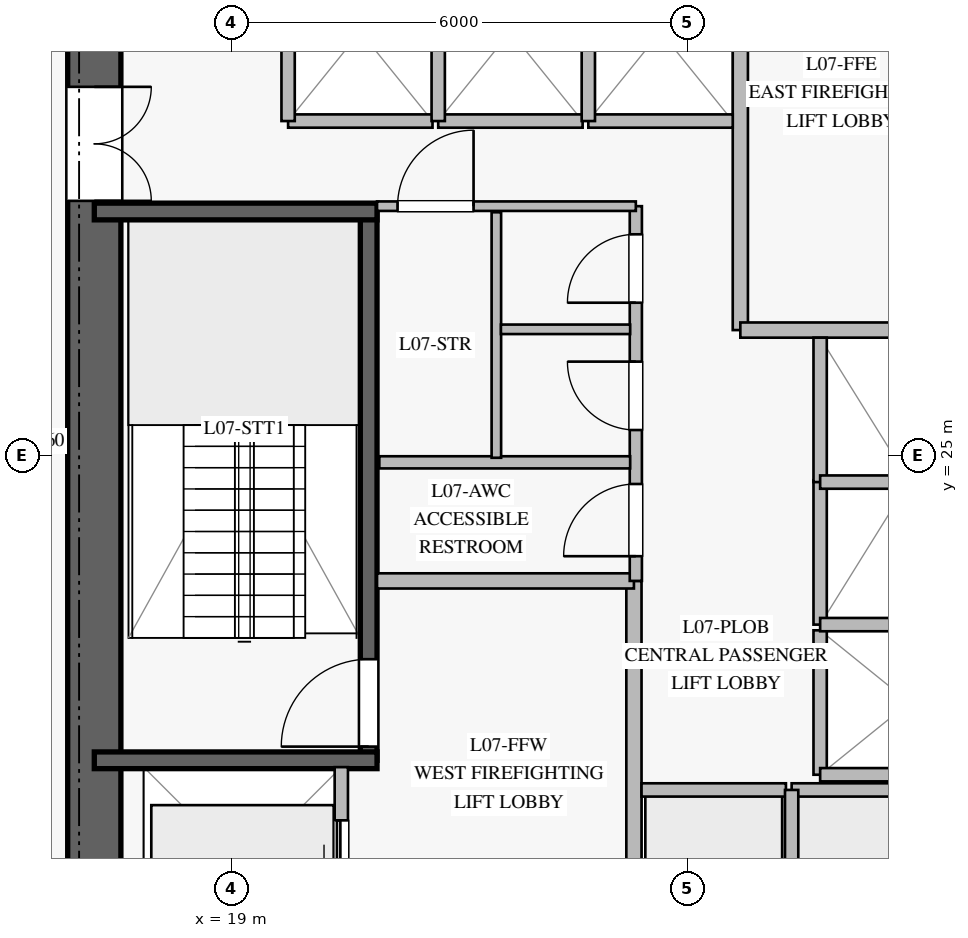
"""IFC4 building model, lengths in metres.
Left out: names, types, materials, properties, quantities, classifications, styles, units other than length and angle.
Written with IfcOpenShell. Run it as: python <this file> out.ifc"""

import sys

from ifc_helpers import new_model, si_unit, direction, frame, frame_2d, origin, place, context, subcontext, project, spatial, rectangle, extrude, element, fill, save


model = new_model("IFC4")
c1 = context("Model", 3, precision=1e-05, world=origin(), true_north=direction((0.0, 1.0)))
c2 = subcontext(c1, "Body", "Model", "MODEL_VIEW")
j1 = project(units=[si_unit("LENGTHUNIT", "METRE"), si_unit("PLANEANGLEUNIT", "RADIAN")], contexts=[c1])
p1 = place(None, origin())
s1 = spatial("IfcSite", under=j1, at=p1, CompositionType="ELEMENT")
p2 = place(p1, origin())
s2 = spatial("IfcBuilding", under=s1, at=p2, CompositionType="ELEMENT")
p3 = place(p2, frame((0.0, 0.0, 32.0)))
s3 = spatial("IfcBuildingStorey", under=s2, at=p3, CompositionType="ELEMENT", Elevation=32.0)
p4 = place(p3, frame((17.2, 31.85, 0.0), z_axis=(0.0, 0.0, 1.0), x_axis=(0.0, -1.0, 0.0)))
e1 = element("IfcWall", 1, at=p4, inside=s3, PredefinedType="SHEAR", context=c2, shape_type="SweptSolid", body=[
    extrude(rectangle(XDim=13.7, YDim=0.7, at=frame_2d((6.85, 0.0))), origin(), (0.0, 0.0, 1.0), 3.76),
])
p5 = place(p4, frame((2.0, 0.0, 0.0)))
e2 = element("IfcOpeningElement", 2, at=p5, cuts=e1, PredefinedType="OPENING", context=c2, shape_type="SweptSolid", body=[
    extrude(rectangle(XDim=1.5, YDim=2.2, at=frame_2d((0.75, 1.1))), frame((0.0, 0.36, 0.0), z_axis=(0.0, -1.0, 0.0), x_axis=(1.0, 0.0, 0.0)), (0.0, 0.0, 1.0), 0.72),
])
p6 = place(p3, frame((20.81, 20.99, 0.0), z_axis=(0.0, 0.0, 1.0), x_axis=(0.0, 1.0, 0.0)))
e3 = element("IfcWall", 3, at=p6, inside=s3, PredefinedType="SOLIDWALL", context=c2, shape_type="SweptSolid", body=[
    extrude(rectangle(XDim=7.22, YDim=0.22, at=frame_2d((3.61, 0.0))), origin(), (0.0, 0.0, 1.0), 3.76),
])
p7 = place(p6, frame((0.18, 0.0, 0.0)))
e4 = element("IfcOpeningElement", 4, at=p7, cuts=e3, PredefinedType="OPENING", context=c2, shape_type="SweptSolid", body=[
    extrude(rectangle(XDim=1.15, YDim=2.2, at=frame_2d((0.575, 1.1))), frame((0.0, 0.12, 0.0), z_axis=(0.0, -1.0, 0.0), x_axis=(1.0, 0.0, 0.0)), (0.0, 0.0, 1.0), 0.24),
])
for number, where, z_axis, x_axis in (
    (5, (17.2, 20.99, 0.0), (0.0, 0.0, 1.0), (1.0, 0.0, 0.0)),
    (6, (17.2, 28.21, 0.0), (0.0, 0.0, 1.0), (1.0, 0.0, 0.0)),
):
    element("IfcWall", number, at=place(p3, frame(where, z_axis=z_axis, x_axis=x_axis)), inside=s3, PredefinedType="SOLIDWALL", context=c2, shape_type="SweptSolid", body=[
        extrude(rectangle(XDim=3.72, YDim=0.22, at=frame_2d((1.86, 0.0))), origin(), (0.0, 0.0, 1.0), 3.76),
    ])
p8 = place(p3, frame((24.3, 18.2, 0.0), z_axis=(0.0, 0.0, 1.0), x_axis=(0.0, 1.0, 0.0)))
e7 = element("IfcWall", 7, at=p8, inside=s3, PredefinedType="PARTITIONING", context=c2, shape_type="SweptSolid", body=[
    extrude(rectangle(XDim=5.15, YDim=0.2, at=frame_2d((2.575, 0.0))), origin(), (0.0, 0.0, 1.0), 3.76),
])
p9 = place(p3, frame((20.92, 23.35, 0.0), z_axis=(0.0, 0.0, 1.0), x_axis=(1.0, 0.0, 0.0)))
e8 = element("IfcWall", 8, at=p9, inside=s3, PredefinedType="PARTITIONING", context=c2, shape_type="SweptSolid", body=[
    extrude(rectangle(XDim=3.38, YDim=0.2, at=frame_2d((1.69, 0.0))), origin(), (0.0, 0.0, 1.0), 3.76),
])
p10 = place(p3, frame((25.7, 26.65, 0.0), z_axis=(0.0, 0.0, 1.0), x_axis=(0.0, 1.0, 0.0)))
e9 = element("IfcWall", 9, at=p10, inside=s3, PredefinedType="PARTITIONING", context=c2, shape_type="SweptSolid", body=[
    extrude(rectangle(XDim=5.15, YDim=0.2, at=frame_2d((2.575, 0.0))), origin(), (0.0, 0.0, 1.0), 3.76),
])
p11 = place(p3, frame((25.7, 26.65, 0.0), z_axis=(0.0, 0.0, 1.0), x_axis=(1.0, 0.0, 0.0)))
e10 = element("IfcWall", 10, at=p11, inside=s3, PredefinedType="PARTITIONING", context=c2, shape_type="SweptSolid", body=[
    extrude(rectangle(XDim=3.38, YDim=0.2, at=frame_2d((1.69, 0.0))), origin(), (0.0, 0.0, 1.0), 3.76),
])
p12 = place(p3, frame((24.325, 23.35, 0.0), z_axis=(0.0, 0.0, 1.0), x_axis=(0.0, 1.0, 0.0)))
e11 = element("IfcWall", 11, at=p12, inside=s3, PredefinedType="PLUMBINGWALL", context=c2, shape_type="SweptSolid", body=[
    extrude(rectangle(XDim=4.93, YDim=0.16, at=frame_2d((2.465, 0.0))), origin(), (0.0, 0.0, 1.0), 3.76),
])
p13 = place(p12, frame((0.325, 0.0, 0.0)))
e12 = element("IfcOpeningElement", 12, at=p13, cuts=e11, PredefinedType="OPENING", context=c2, shape_type="SweptSolid", body=[
    extrude(rectangle(XDim=0.95, YDim=2.1, at=frame_2d((0.475, 1.05))), frame((0.0, 0.09, 0.0), z_axis=(0.0, -1.0, 0.0), x_axis=(1.0, 0.0, 0.0)), (0.0, 0.0, 1.0), 0.18),
])
p14 = place(p12, frame((1.985, 0.0, 0.0)))
e13 = element("IfcOpeningElement", 13, at=p14, cuts=e11, PredefinedType="OPENING", context=c2, shape_type="SweptSolid", body=[
    extrude(rectangle(XDim=0.9, YDim=2.1, at=frame_2d((0.45, 1.05))), frame((0.0, 0.09, 0.0), z_axis=(0.0, -1.0, 0.0), x_axis=(1.0, 0.0, 0.0)), (0.0, 0.0, 1.0), 0.18),
])
p15 = place(p12, frame((3.66, 0.0, 0.0)))
e14 = element("IfcOpeningElement", 14, at=p15, cuts=e11, PredefinedType="OPENING", context=c2, shape_type="SweptSolid", body=[
    extrude(rectangle(XDim=0.9, YDim=2.1, at=frame_2d((0.45, 1.05))), frame((0.0, 0.09, 0.0), z_axis=(0.0, -1.0, 0.0), x_axis=(1.0, 0.0, 0.0)), (0.0, 0.0, 1.0), 0.18),
])
p16 = place(p3, frame((20.92, 28.28, 0.0), z_axis=(0.0, 0.0, 1.0), x_axis=(1.0, 0.0, 0.0)))
e15 = element("IfcWall", 15, at=p16, inside=s3, PredefinedType="PARTITIONING", context=c2, shape_type="SweptSolid", body=[
    extrude(rectangle(XDim=3.405, YDim=0.125, at=frame_2d((1.703, 0.0))), origin(), (0.0, 0.0, 1.0), 3.76),
])
p17 = place(p16, frame((0.27, 0.0, 0.0)))
e16 = element("IfcOpeningElement", 16, at=p17, cuts=e15, PredefinedType="OPENING", context=c2, shape_type="SweptSolid", body=[
    extrude(rectangle(XDim=1.0, YDim=2.15, at=frame_2d((0.5, 1.075))), frame((0.0, 0.073, 0.0), z_axis=(0.0, -1.0, 0.0), x_axis=(1.0, 0.0, 0.0)), (0.0, 0.0, 1.0), 0.145),
])
p18 = place(p3, frame((20.95, 24.91, 0.0), z_axis=(0.0, 0.0, 1.0), x_axis=(1.0, 0.0, 0.0)))
e17 = element("IfcWall", 17, at=p18, inside=s3, PredefinedType="PLUMBINGWALL", context=c2, shape_type="SweptSolid", body=[
    extrude(rectangle(XDim=3.3, YDim=0.16, at=frame_2d((1.65, 0.0))), origin(), (0.0, 0.0, 1.0), 3.76),
])
p19 = place(p3, frame((22.49, 24.97, 0.0), z_axis=(0.0, 0.0, 1.0), x_axis=(0.0, 1.0, 0.0)))
e18 = element("IfcWall", 18, at=p19, inside=s3, PredefinedType="PARTITIONING", context=c2, shape_type="SweptSolid", body=[
    extrude(rectangle(XDim=3.23, YDim=0.125, at=frame_2d((1.615, 0.0))), origin(), (0.0, 0.0, 1.0), 3.76),
])
p20 = place(p3, frame((22.55, 26.66, 0.0), z_axis=(0.0, 0.0, 1.0), x_axis=(1.0, 0.0, 0.0)))
e19 = element("IfcWall", 19, at=p20, inside=s3, PredefinedType="PARTITIONING", context=c2, shape_type="SweptSolid", body=[
    extrude(rectangle(XDim=1.7, YDim=0.125, at=frame_2d((0.85, 0.0))), origin(), (0.0, 0.0, 1.0), 3.76),
])
p21 = place(p3, frame((24.4, 20.6, 0.0), z_axis=(0.0, 0.0, 1.0), x_axis=(1.0, 0.0, 0.0)))
e20 = element("IfcWall", 20, at=p21, inside=s3, PredefinedType="PARTITIONING", context=c2, shape_type="SweptSolid", body=[
    extrude(rectangle(XDim=1.9, YDim=0.175, at=frame_2d((0.95, 0.0))), origin(), (0.0, 0.0, 1.0), 3.76),
])
p22 = place(p3, frame((26.375, 20.6, 0.0), z_axis=(0.0, 0.0, 1.0), x_axis=(1.0, 0.0, 0.0)))
e21 = element("IfcWall", 21, at=p22, inside=s3, PredefinedType="PARTITIONING", context=c2, shape_type="SweptSolid", body=[
    extrude(rectangle(XDim=1.9, YDim=0.175, at=frame_2d((0.95, 0.0))), origin(), (0.0, 0.0, 1.0), 3.76),
])
p23 = place(p3, frame((26.375, 18.25, 0.0), z_axis=(0.0, 0.0, 1.0), x_axis=(0.0, 1.0, 0.0)))
e22 = element("IfcWall", 22, at=p23, inside=s3, PredefinedType="PARTITIONING", context=c2, shape_type="SweptSolid", body=[
    extrude(rectangle(XDim=2.35, YDim=0.175, at=frame_2d((1.175, 0.0))), origin(), (0.0, 0.0, 1.0), 3.76),
])
p24 = place(p3, frame((19.75, 29.4, 0.0), z_axis=(0.0, 0.0, 1.0), x_axis=(1.0, 0.0, 0.0)))
e23 = element("IfcWall", 23, at=p24, inside=s3, PredefinedType="PARTITIONING", context=c2, shape_type="SweptSolid", body=[
    extrude(rectangle(XDim=1.9, YDim=0.175, at=frame_2d((0.95, 0.0))), origin(), (0.0, 0.0, 1.0), 3.76),
])
p25 = place(p3, frame((19.75, 29.4, 0.0), z_axis=(0.0, 0.0, 1.0), x_axis=(0.0, 1.0, 0.0)))
e24 = element("IfcWall", 24, at=p25, inside=s3, PredefinedType="PARTITIONING", context=c2, shape_type="SweptSolid", body=[
    extrude(rectangle(XDim=2.35, YDim=0.175, at=frame_2d((1.175, 0.0))), origin(), (0.0, 0.0, 1.0), 3.76),
])
p26 = place(p3, frame((21.725, 29.4, 0.0), z_axis=(0.0, 0.0, 1.0), x_axis=(1.0, 0.0, 0.0)))
e25 = element("IfcWall", 25, at=p26, inside=s3, PredefinedType="PARTITIONING", context=c2, shape_type="SweptSolid", body=[
    extrude(rectangle(XDim=1.9, YDim=0.175, at=frame_2d((0.95, 0.0))), origin(), (0.0, 0.0, 1.0), 3.76),
])
p27 = place(p3, frame((21.725, 29.4, 0.0), z_axis=(0.0, 0.0, 1.0), x_axis=(0.0, 1.0, 0.0)))
e26 = element("IfcWall", 26, at=p27, inside=s3, PredefinedType="PARTITIONING", context=c2, shape_type="SweptSolid", body=[
    extrude(rectangle(XDim=2.35, YDim=0.175, at=frame_2d((1.175, 0.0))), origin(), (0.0, 0.0, 1.0), 3.76),
])
p28 = place(p3, frame((23.7, 29.4, 0.0), z_axis=(0.0, 0.0, 1.0), x_axis=(1.0, 0.0, 0.0)))
e27 = element("IfcWall", 27, at=p28, inside=s3, PredefinedType="PARTITIONING", context=c2, shape_type="SweptSolid", body=[
    extrude(rectangle(XDim=1.9, YDim=0.175, at=frame_2d((0.95, 0.0))), origin(), (0.0, 0.0, 1.0), 3.76),
])
p29 = place(p3, frame((23.7, 29.4, 0.0), z_axis=(0.0, 0.0, 1.0), x_axis=(0.0, 1.0, 0.0)))
e28 = element("IfcWall", 28, at=p29, inside=s3, PredefinedType="PARTITIONING", context=c2, shape_type="SweptSolid", body=[
    extrude(rectangle(XDim=2.35, YDim=0.175, at=frame_2d((1.175, 0.0))), origin(), (0.0, 0.0, 1.0), 3.76),
])
p30 = place(p3, frame((26.75, 20.8, 0.0), z_axis=(0.0, 0.0, 1.0), x_axis=(0.0, 1.0, 0.0)))
e29 = element("IfcWall", 29, at=p30, inside=s3, PredefinedType="PARTITIONING", context=c2, shape_type="SweptSolid", body=[
    extrude(rectangle(XDim=1.9, YDim=0.175, at=frame_2d((0.95, 0.0))), origin(), (0.0, 0.0, 1.0), 3.76),
])
p31 = place(p3, frame((26.75, 20.8, 0.0), z_axis=(0.0, 0.0, 1.0), x_axis=(1.0, 0.0, 0.0)))
e30 = element("IfcWall", 30, at=p31, inside=s3, PredefinedType="PARTITIONING", context=c2, shape_type="SweptSolid", body=[
    extrude(rectangle(XDim=2.35, YDim=0.175, at=frame_2d((1.175, 0.0))), origin(), (0.0, 0.0, 1.0), 3.76),
])
p32 = place(p3, frame((26.75, 22.775, 0.0), z_axis=(0.0, 0.0, 1.0), x_axis=(0.0, 1.0, 0.0)))
e31 = element("IfcWall", 31, at=p32, inside=s3, PredefinedType="PARTITIONING", context=c2, shape_type="SweptSolid", body=[
    extrude(rectangle(XDim=1.9, YDim=0.175, at=frame_2d((0.95, 0.0))), origin(), (0.0, 0.0, 1.0), 3.76),
])
p33 = place(p3, frame((26.75, 22.775, 0.0), z_axis=(0.0, 0.0, 1.0), x_axis=(1.0, 0.0, 0.0)))
e32 = element("IfcWall", 32, at=p33, inside=s3, PredefinedType="PARTITIONING", context=c2, shape_type="SweptSolid", body=[
    extrude(rectangle(XDim=2.35, YDim=0.175, at=frame_2d((1.175, 0.0))), origin(), (0.0, 0.0, 1.0), 3.76),
])
p34 = place(p3, frame((26.75, 24.65, 0.0), z_axis=(0.0, 0.0, 1.0), x_axis=(0.0, 1.0, 0.0)))
e33 = element("IfcWall", 33, at=p34, inside=s3, PredefinedType="PARTITIONING", context=c2, shape_type="SweptSolid", body=[
    extrude(rectangle(XDim=1.9, YDim=0.175, at=frame_2d((0.95, 0.0))), origin(), (0.0, 0.0, 1.0), 3.76),
])
p35 = place(p3, frame((26.75, 24.65, 0.0), z_axis=(0.0, 0.0, 1.0), x_axis=(1.0, 0.0, 0.0)))
e34 = element("IfcWall", 34, at=p35, inside=s3, PredefinedType="PARTITIONING", context=c2, shape_type="SweptSolid", body=[
    extrude(rectangle(XDim=2.35, YDim=0.175, at=frame_2d((1.175, 0.0))), origin(), (0.0, 0.0, 1.0), 3.76),
])
p36 = place(p3, frame((20.45, 18.3, 0.0), z_axis=(0.0, 0.0, 1.0), x_axis=(0.0, 1.0, 0.0)))
e35 = element("IfcWall", 35, at=p36, inside=s3, PredefinedType="PARTITIONING", context=c2, shape_type="SweptSolid", body=[
    extrude(rectangle(XDim=2.6, YDim=0.175, at=frame_2d((1.3, 0.0))), origin(), (0.0, 0.0, 1.0), 3.76),
])
p37 = place(p36, frame((0.7, 0.0, 0.0)))
e36 = element("IfcOpeningElement", 36, at=p37, cuts=e35, PredefinedType="OPENING", context=c2, shape_type="SweptSolid", body=[
    extrude(rectangle(XDim=1.2, YDim=2.2, at=frame_2d((0.6, 1.1))), frame((0.0, 0.098, 0.0), z_axis=(0.0, -1.0, 0.0), x_axis=(1.0, 0.0, 0.0)), (0.0, 0.0, 1.0), 0.195),
])
p38 = place(p7, origin())
e37 = element("IfcDoor", 37, at=p38, inside=s3, OperationType="SINGLE_SWING_LEFT", PredefinedType="DOOR", context=c2, shape_type="SweptSolid", body=[
    extrude(rectangle(XDim=1.15, YDim=2.2, at=frame_2d((0.575, 1.1))), frame((0.0, 0.025, 0.0), z_axis=(0.0, -1.0, 0.0), x_axis=(1.0, 0.0, 0.0)), (0.0, 0.0, 1.0), 0.05),
])
fill(e4, e37)
p39 = place(p5, origin())
e38 = element("IfcDoor", 38, at=p39, inside=s3, OperationType="DOUBLE_DOOR_SINGLE_SWING", PredefinedType="DOOR", context=c2, shape_type="SweptSolid", body=[
    extrude(rectangle(XDim=1.5, YDim=2.2, at=frame_2d((0.75, 1.1))), frame((0.0, 0.025, 0.0), z_axis=(0.0, -1.0, 0.0), x_axis=(1.0, 0.0, 0.0)), (0.0, 0.0, 1.0), 0.05),
])
fill(e2, e38)
p40 = place(p13, origin())
e39 = element("IfcDoor", 39, at=p40, inside=s3, OperationType="SINGLE_SWING_LEFT", PredefinedType="DOOR", context=c2, shape_type="SweptSolid", body=[
    extrude(rectangle(XDim=0.95, YDim=2.1, at=frame_2d((0.475, 1.05))), frame((0.0, 0.025, 0.0), z_axis=(0.0, -1.0, 0.0), x_axis=(1.0, 0.0, 0.0)), (0.0, 0.0, 1.0), 0.05),
])
fill(e12, e39)
p41 = place(p14, origin())
e40 = element("IfcDoor", 40, at=p41, inside=s3, OperationType="SINGLE_SWING_RIGHT", PredefinedType="DOOR", context=c2, shape_type="SweptSolid", body=[
    extrude(rectangle(XDim=0.9, YDim=2.1, at=frame_2d((0.45, 1.05))), frame((0.0, 0.025, 0.0), z_axis=(0.0, -1.0, 0.0), x_axis=(1.0, 0.0, 0.0)), (0.0, 0.0, 1.0), 0.05),
])
fill(e13, e40)
p42 = place(p15, origin())
e41 = element("IfcDoor", 41, at=p42, inside=s3, OperationType="SINGLE_SWING_LEFT", PredefinedType="DOOR", context=c2, shape_type="SweptSolid", body=[
    extrude(rectangle(XDim=0.9, YDim=2.1, at=frame_2d((0.45, 1.05))), frame((0.0, 0.025, 0.0), z_axis=(0.0, -1.0, 0.0), x_axis=(1.0, 0.0, 0.0)), (0.0, 0.0, 1.0), 0.05),
])
fill(e14, e41)
p43 = place(p17, origin())
e42 = element("IfcDoor", 42, at=p43, inside=s3, OperationType="SINGLE_SWING_RIGHT", PredefinedType="DOOR", context=c2, shape_type="SweptSolid", body=[
    extrude(rectangle(XDim=1.0, YDim=2.15, at=frame_2d((0.5, 1.075))), frame((0.0, 0.025, 0.0), z_axis=(0.0, -1.0, 0.0), x_axis=(1.0, 0.0, 0.0)), (0.0, 0.0, 1.0), 0.05),
])
fill(e16, e42)
p44 = place(p37, origin())
e43 = element("IfcDoor", 43, at=p44, inside=s3, OperationType="DOUBLE_DOOR_SLIDING", PredefinedType="DOOR", context=c2, shape_type="SweptSolid", body=[
    extrude(rectangle(XDim=1.2, YDim=2.2, at=frame_2d((0.6, 1.1))), frame((0.0, 0.025, 0.0), z_axis=(0.0, -1.0, 0.0), x_axis=(1.0, 0.0, 0.0)), (0.0, 0.0, 1.0), 0.05),
])
fill(e36, e43)
save(model, sys.argv[1])
